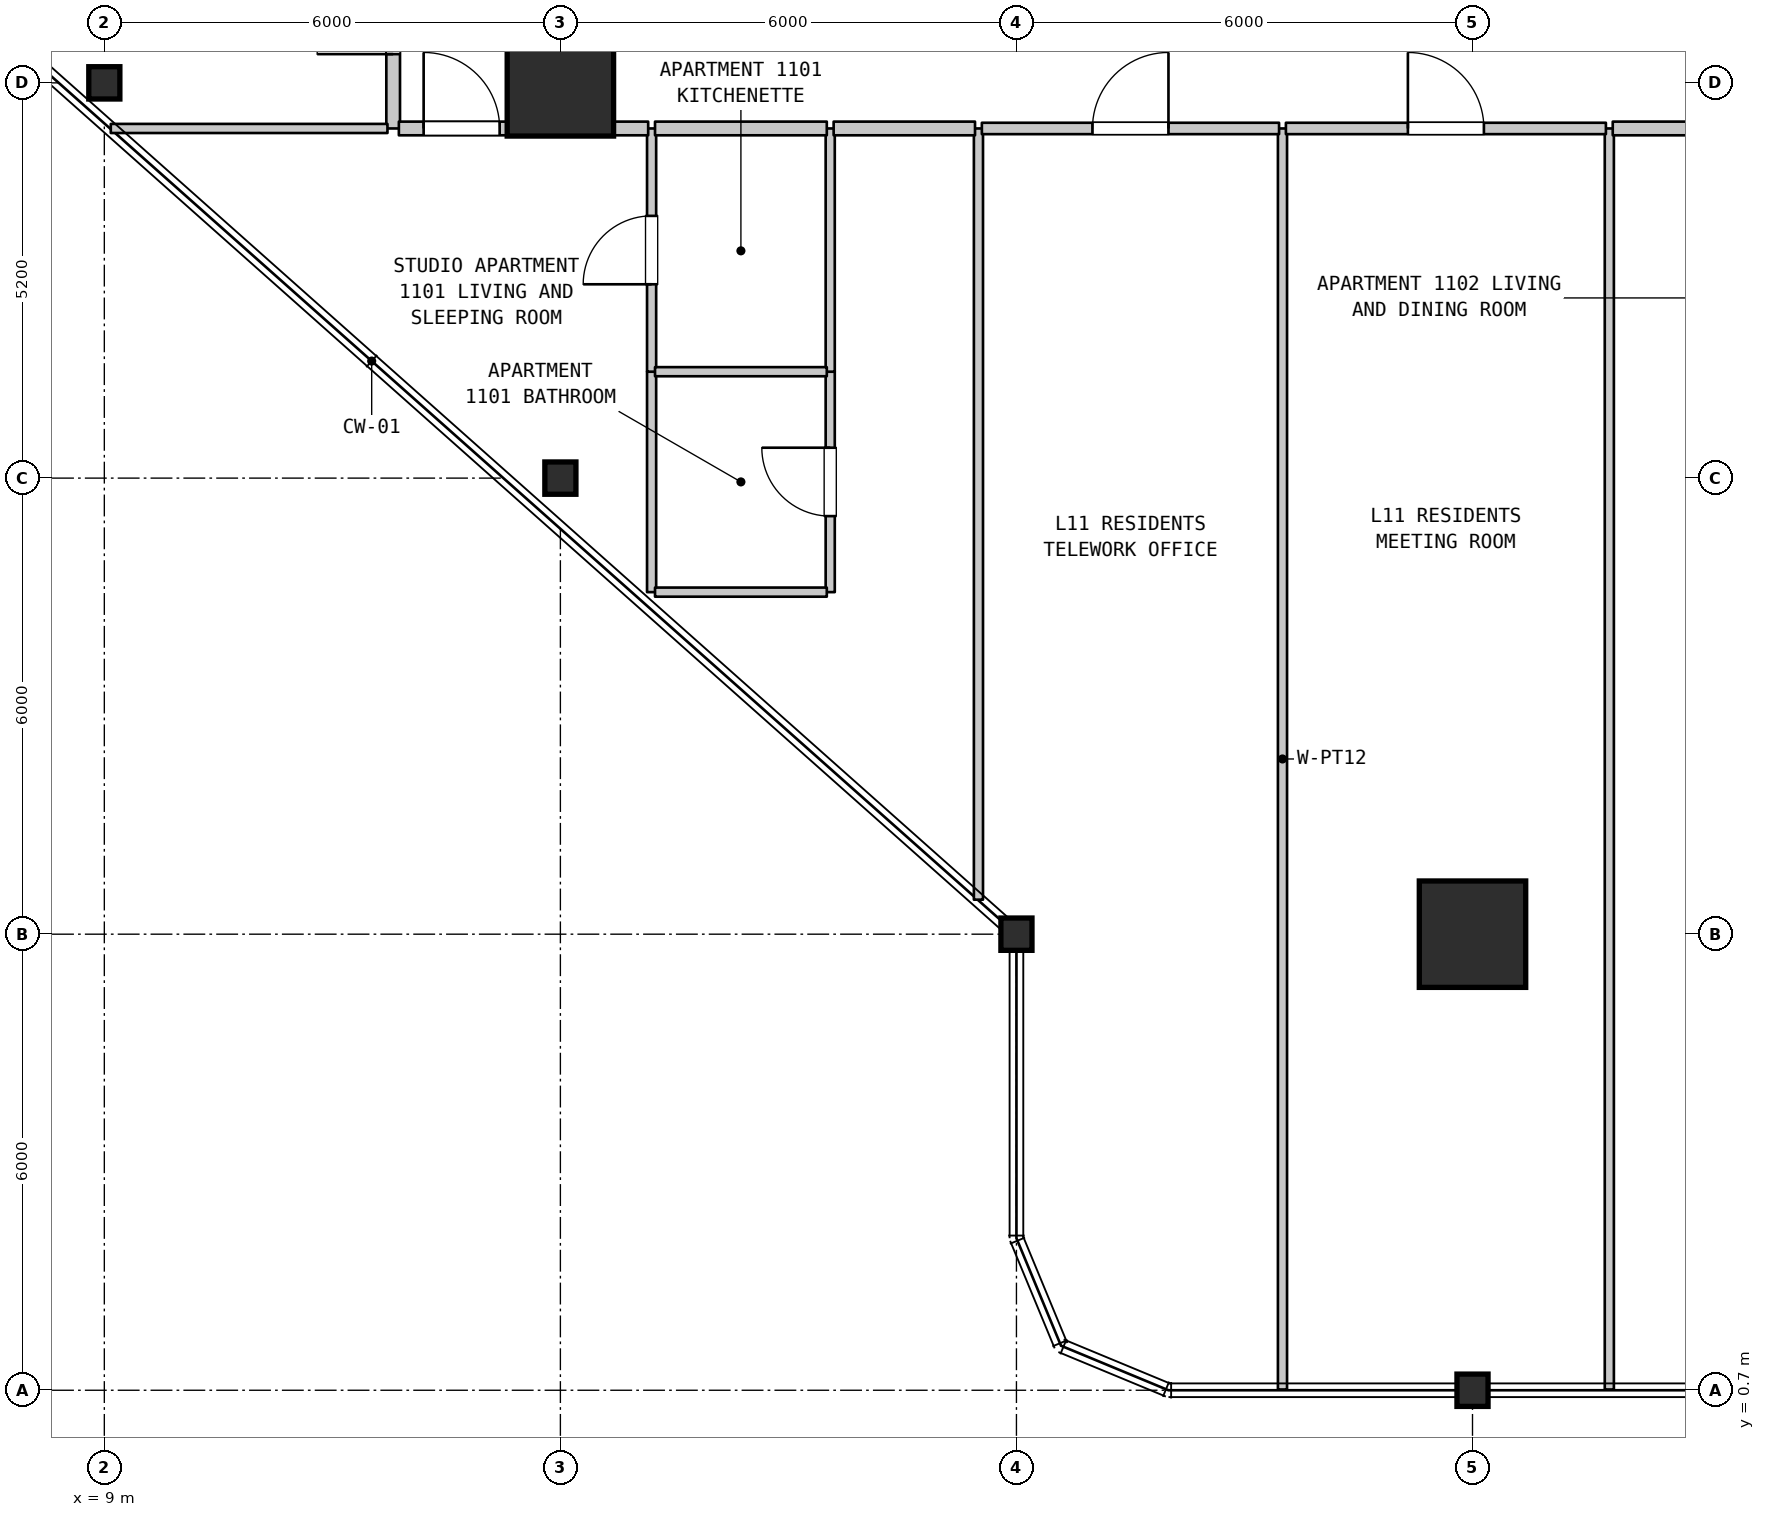
"""IFC4 building model, lengths in metres.
Left out: names, types, materials, properties, quantities, classifications, styles, units other than length and angle.
Written with IfcOpenShell. Run it as: python <this file> out.ifc"""

import sys

from ifc_helpers import new_model, si_unit, direction, frame, frame_2d, origin, origin_2d, place, context, subcontext, project, spatial, rectangle, i_section, extrude, element, fill, save


model = new_model("IFC4")
c1 = context("Model", 3, precision=1e-05, world=origin(), true_north=direction((0.0, 1.0)))
c2 = subcontext(c1, "Body", "Model", "MODEL_VIEW")
j1 = project(units=[si_unit("LENGTHUNIT", "METRE"), si_unit("PLANEANGLEUNIT", "RADIAN")], contexts=[c1])
p1 = place(None, origin())
s1 = spatial("IfcSite", under=j1, at=p1, CompositionType="ELEMENT")
p2 = place(p1, origin())
s2 = spatial("IfcBuilding", under=s1, at=p2, CompositionType="ELEMENT")
p3 = place(p2, frame((0.0, 0.0, 49.9)))
s3 = spatial("IfcBuildingStorey", under=s2, at=p3, CompositionType="ELEMENT", Elevation=49.9)
for number, where, z_axis, x_axis in (
    (1, (9.0, 17.9, 0.0), (0.0, 0.0, 1.0), (1.0, 0.0, 0.0)),
    (2, (15.0, 12.7, 0.0), (0.0, 0.0, 1.0), (1.0, 0.0, 0.0)),
):
    element("IfcColumn", number, at=place(p3, frame(where, z_axis=z_axis, x_axis=x_axis)), inside=s3, PredefinedType="COLUMN", context=c2, shape_type="SweptSolid", body=[
        extrude(i_section(OverallWidth=0.409, OverallDepth=0.425, WebThickness=0.032, FlangeThickness=0.052, FilletRadius=0.015, at=origin_2d()), origin(), (0.0, 0.0, 1.0), 3.7),
    ])
p4 = place(p3, frame((15.0, 17.9, 0.0), z_axis=(0.0, 0.0, 1.0), x_axis=(1.0, 0.0, 0.0)))
e3 = element("IfcColumn", 3, at=p4, inside=s3, PredefinedType="COLUMN", context=c2, shape_type="SweptSolid", body=[
    extrude(rectangle(XDim=1.4, YDim=1.4, at=origin_2d()), origin(), (0.0, 0.0, 1.0), 3.7),
])
for number, where, z_axis, x_axis in (
    (4, (21.0, 6.7, 0.0), (0.0, 0.0, 1.0), (1.0, 0.0, 0.0)),
    (5, (27.0, 0.7, 0.0), (0.0, 0.0, 1.0), (1.0, 0.0, 0.0)),
):
    element("IfcColumn", number, at=place(p3, frame(where, z_axis=z_axis, x_axis=x_axis)), inside=s3, PredefinedType="COLUMN", context=c2, shape_type="SweptSolid", body=[
        extrude(i_section(OverallWidth=0.409, OverallDepth=0.425, WebThickness=0.032, FlangeThickness=0.052, FilletRadius=0.015, at=origin_2d()), origin(), (0.0, 0.0, 1.0), 3.7),
    ])
p5 = place(p3, frame((27.0, 6.7, 0.0), z_axis=(0.0, 0.0, 1.0), x_axis=(1.0, 0.0, 0.0)))
e6 = element("IfcColumn", 6, at=p5, inside=s3, PredefinedType="COLUMN", context=c2, shape_type="SweptSolid", body=[
    extrude(rectangle(XDim=1.4, YDim=1.4, at=origin_2d()), origin(), (0.0, 0.0, 1.0), 3.7),
])
p6 = place(p3, frame((12.8, 17.3, 0.0), z_axis=(0.0, 0.0, 1.0), x_axis=(0.0, 1.0, 0.0)))
e7 = element("IfcWall", 7, at=p6, inside=s3, PredefinedType="STANDARD", context=c2, shape_type="SweptSolid", body=[
    extrude(rectangle(XDim=3.1, YDim=0.18, at=frame_2d((1.55, 0.0))), origin(), (0.0, 0.0, 1.0), 3.385),
])
p7 = place(p6, frame((0.978, 0.0, 0.0)))
e8 = element("IfcOpeningElement", 8, at=p7, cuts=e7, PredefinedType="OPENING", context=c2, shape_type="SweptSolid", body=[
    extrude(rectangle(XDim=1.0, YDim=2.15, at=frame_2d((0.5, 1.075))), frame((0.0, 0.1, 0.0), z_axis=(0.0, -1.0, 0.0), x_axis=(1.0, 0.0, 0.0)), (0.0, 0.0, 1.0), 0.2),
])
p8 = place(p3, frame((16.2, 11.2, 0.0), z_axis=(0.0, 0.0, 1.0), x_axis=(0.0, 1.0, 0.0)))
e9 = element("IfcWall", 9, at=p8, inside=s3, PredefinedType="PARTITIONING", context=c2, shape_type="SweptSolid", body=[
    extrude(rectangle(XDim=2.9, YDim=0.12, at=frame_2d((1.45, 0.0))), origin(), (0.0, 0.0, 1.0), 3.385),
])
p9 = place(p3, frame((16.2, 14.1, 0.0), z_axis=(0.0, 0.0, 1.0), x_axis=(0.0, 1.0, 0.0)))
e10 = element("IfcWall", 10, at=p9, inside=s3, PredefinedType="PARTITIONING", context=c2, shape_type="SweptSolid", body=[
    extrude(rectangle(XDim=3.2, YDim=0.12, at=frame_2d((1.6, 0.0))), origin(), (0.0, 0.0, 1.0), 3.385),
])
p10 = place(p9, frame((1.15, 0.0, 0.0)))
e11 = element("IfcOpeningElement", 11, at=p10, cuts=e10, PredefinedType="OPENING", context=c2, shape_type="SweptSolid", body=[
    extrude(rectangle(XDim=0.9, YDim=2.15, at=frame_2d((0.45, 1.075))), frame((0.0, 0.07, 0.0), z_axis=(0.0, -1.0, 0.0), x_axis=(1.0, 0.0, 0.0)), (0.0, 0.0, 1.0), 0.14),
])
p11 = place(p3, frame((18.55, 11.2, 0.0), z_axis=(0.0, 0.0, 1.0), x_axis=(0.0, 1.0, 0.0)))
e12 = element("IfcWall", 12, at=p11, inside=s3, PredefinedType="PARTITIONING", context=c2, shape_type="SweptSolid", body=[
    extrude(rectangle(XDim=2.9, YDim=0.12, at=frame_2d((1.45, 0.0))), origin(), (0.0, 0.0, 1.0), 3.385),
])
p12 = place(p11, frame((1.0, 0.0, 0.0)))
e13 = element("IfcOpeningElement", 13, at=p12, cuts=e12, PredefinedType="OPENING", context=c2, shape_type="SweptSolid", body=[
    extrude(rectangle(XDim=0.9, YDim=2.1, at=frame_2d((0.45, 1.05))), frame((0.0, 0.07, 0.0), z_axis=(0.0, -1.0, 0.0), x_axis=(1.0, 0.0, 0.0)), (0.0, 0.0, 1.0), 0.14),
])
p13 = place(p3, frame((18.55, 14.1, 0.0), z_axis=(0.0, 0.0, 1.0), x_axis=(0.0, 1.0, 0.0)))
e14 = element("IfcWall", 14, at=p13, inside=s3, PredefinedType="PARTITIONING", context=c2, shape_type="SweptSolid", body=[
    extrude(rectangle(XDim=3.2, YDim=0.12, at=frame_2d((1.6, 0.0))), origin(), (0.0, 0.0, 1.0), 3.385),
])
p14 = place(p3, frame((20.5, 7.154, 0.0), z_axis=(0.0, 0.0, 1.0), x_axis=(0.0, 1.0, 0.0)))
e15 = element("IfcWall", 15, at=p14, inside=s3, PredefinedType="PARTITIONING", context=c2, shape_type="SweptSolid", body=[
    extrude(rectangle(XDim=10.146, YDim=0.12, at=frame_2d((5.073, 0.0))), origin(), (0.0, 0.0, 1.0), 3.385),
])
for number, where, z_axis, x_axis in (
    (16, (24.5, 0.71, 0.0), (0.0, 0.0, 1.0), (0.0, 1.0, 0.0)),
    (17, (28.8, 0.71, 0.0), (0.0, 0.0, 1.0), (0.0, 1.0, 0.0)),
):
    element("IfcWall", number, at=place(p3, frame(where, z_axis=z_axis, x_axis=x_axis)), inside=s3, PredefinedType="PARTITIONING", context=c2, shape_type="SweptSolid", body=[
        extrude(rectangle(XDim=16.59, YDim=0.12, at=frame_2d((8.295, 0.0))), origin(), (0.0, 0.0, 1.0), 3.385),
    ])
for number, where, z_axis, x_axis in (
    (18, (16.245, 11.2, 0.0), (0.0, 0.0, 1.0), (1.0, 0.0, 0.0)),
    (19, (16.245, 14.1, 0.0), (0.0, 0.0, 1.0), (1.0, 0.0, 0.0)),
):
    element("IfcWall", number, at=place(p3, frame(where, z_axis=z_axis, x_axis=x_axis)), inside=s3, PredefinedType="PARTITIONING", context=c2, shape_type="SweptSolid", body=[
        extrude(rectangle(XDim=2.26, YDim=0.12, at=frame_2d((1.13, 0.0))), origin(), (0.0, 0.0, 1.0), 3.385),
    ])
p15 = place(p3, frame((9.085, 17.3, 0.0), z_axis=(0.0, 0.0, 1.0), x_axis=(1.0, 0.0, 0.0)))
e20 = element("IfcWall", 20, at=p15, inside=s3, PredefinedType="PARTITIONING", context=c2, shape_type="SweptSolid", body=[
    extrude(rectangle(XDim=3.64, YDim=0.12, at=frame_2d((1.82, 0.0))), origin(), (0.0, 0.0, 1.0), 3.385),
])
p16 = place(p3, frame((12.875, 17.3, 0.0), z_axis=(0.0, 0.0, 1.0), x_axis=(1.0, 0.0, 0.0)))
e21 = element("IfcWall", 21, at=p16, inside=s3, PredefinedType="STANDARD", context=c2, shape_type="SweptSolid", body=[
    extrude(rectangle(XDim=3.28, YDim=0.18, at=frame_2d((1.64, 0.0))), origin(), (0.0, 0.0, 1.0), 3.385),
])
p17 = place(p16, frame((0.326, 0.0, 0.0)))
e22 = element("IfcOpeningElement", 22, at=p17, cuts=e21, PredefinedType="OPENING", context=c2, shape_type="SweptSolid", body=[
    extrude(rectangle(XDim=1.0, YDim=2.15, at=frame_2d((0.5, 1.075))), frame((0.0, 0.1, 0.0), z_axis=(0.0, -1.0, 0.0), x_axis=(1.0, 0.0, 0.0)), (0.0, 0.0, 1.0), 0.2),
])
p18 = place(p3, frame((16.245, 17.3, 0.0), z_axis=(0.0, 0.0, 1.0), x_axis=(1.0, 0.0, 0.0)))
e23 = element("IfcWall", 23, at=p18, inside=s3, PredefinedType="STANDARD", context=c2, shape_type="SweptSolid", body=[
    extrude(rectangle(XDim=2.26, YDim=0.18, at=frame_2d((1.13, 0.0))), origin(), (0.0, 0.0, 1.0), 3.385),
])
p19 = place(p3, frame((18.595, 17.3, 0.0), z_axis=(0.0, 0.0, 1.0), x_axis=(1.0, 0.0, 0.0)))
e24 = element("IfcWall", 24, at=p19, inside=s3, PredefinedType="STANDARD", context=c2, shape_type="SweptSolid", body=[
    extrude(rectangle(XDim=1.86, YDim=0.18, at=frame_2d((0.93, 0.0))), origin(), (0.0, 0.0, 1.0), 3.385),
])
p20 = place(p3, frame((20.545, 17.3, 0.0), z_axis=(0.0, 0.0, 1.0), x_axis=(1.0, 0.0, 0.0)))
e25 = element("IfcWall", 25, at=p20, inside=s3, PredefinedType="STANDARD", context=c2, shape_type="SweptSolid", body=[
    extrude(rectangle(XDim=3.91, YDim=0.15, at=frame_2d((1.955, 0.0))), origin(), (0.0, 0.0, 1.0), 3.385),
])
p21 = place(p20, frame((1.455, 0.0, 0.0)))
e26 = element("IfcOpeningElement", 26, at=p21, cuts=e25, PredefinedType="OPENING", context=c2, shape_type="SweptSolid", body=[
    extrude(rectangle(XDim=1.0, YDim=2.15, at=frame_2d((0.5, 1.075))), frame((0.0, 0.085, 0.0), z_axis=(0.0, -1.0, 0.0), x_axis=(1.0, 0.0, 0.0)), (0.0, 0.0, 1.0), 0.17),
])
p22 = place(p3, frame((24.545, 17.3, 0.0), z_axis=(0.0, 0.0, 1.0), x_axis=(1.0, 0.0, 0.0)))
e27 = element("IfcWall", 27, at=p22, inside=s3, PredefinedType="STANDARD", context=c2, shape_type="SweptSolid", body=[
    extrude(rectangle(XDim=4.21, YDim=0.15, at=frame_2d((2.105, 0.0))), origin(), (0.0, 0.0, 1.0), 3.385),
])
p23 = place(p22, frame((1.605, 0.0, 0.0)))
e28 = element("IfcOpeningElement", 28, at=p23, cuts=e27, PredefinedType="OPENING", context=c2, shape_type="SweptSolid", body=[
    extrude(rectangle(XDim=1.0, YDim=2.15, at=frame_2d((0.5, 1.075))), frame((0.0, 0.085, 0.0), z_axis=(0.0, -1.0, 0.0), x_axis=(1.0, 0.0, 0.0)), (0.0, 0.0, 1.0), 0.17),
])
p24 = place(p3, frame((28.845, 17.3, 0.0), z_axis=(0.0, 0.0, 1.0), x_axis=(1.0, 0.0, 0.0)))
e29 = element("IfcWall", 29, at=p24, inside=s3, PredefinedType="STANDARD", context=c2, shape_type="SweptSolid", body=[
    extrude(rectangle(XDim=4.38, YDim=0.18, at=frame_2d((2.19, 0.0))), origin(), (0.0, 0.0, 1.0), 3.385),
])
p25 = place(p24, frame((1.619, 0.0, 0.0)))
e30 = element("IfcOpeningElement", 30, at=p25, cuts=e29, PredefinedType="OPENING", context=c2, shape_type="SweptSolid", body=[
    extrude(rectangle(XDim=1.0, YDim=2.15, at=frame_2d((0.5, 1.075))), frame((0.0, 0.1, 0.0), z_axis=(0.0, -1.0, 0.0), x_axis=(1.0, 0.0, 0.0)), (0.0, 0.0, 1.0), 0.2),
])
p26 = place(p7, origin())
e31 = element("IfcDoor", 31, at=p26, inside=s3, OperationType="SINGLE_SWING_LEFT", PredefinedType="DOOR", context=c2, shape_type="SweptSolid", body=[
    extrude(rectangle(XDim=1.0, YDim=2.15, at=frame_2d((0.5, 1.075))), frame((0.0, 0.025, 0.0), z_axis=(0.0, -1.0, 0.0), x_axis=(1.0, 0.0, 0.0)), (0.0, 0.0, 1.0), 0.05),
])
fill(e8, e31)
p27 = place(p10, origin())
e32 = element("IfcDoor", 32, at=p27, inside=s3, OperationType="SINGLE_SWING_LEFT", PredefinedType="DOOR", context=c2, shape_type="SweptSolid", body=[
    extrude(rectangle(XDim=0.9, YDim=2.15, at=frame_2d((0.45, 1.075))), frame((0.0, 0.025, 0.0), z_axis=(0.0, -1.0, 0.0), x_axis=(1.0, 0.0, 0.0)), (0.0, 0.0, 1.0), 0.05),
])
fill(e11, e32)
p28 = place(p12, origin())
e33 = element("IfcDoor", 33, at=p28, inside=s3, OperationType="SINGLE_SWING_RIGHT", PredefinedType="DOOR", context=c2, shape_type="SweptSolid", body=[
    extrude(rectangle(XDim=0.9, YDim=2.1, at=frame_2d((0.45, 1.05))), frame((0.0, 0.025, 0.0), z_axis=(0.0, -1.0, 0.0), x_axis=(1.0, 0.0, 0.0)), (0.0, 0.0, 1.0), 0.05),
])
fill(e13, e33)
p29 = place(p17, origin())
e34 = element("IfcDoor", 34, at=p29, inside=s3, OperationType="SINGLE_SWING_LEFT", PredefinedType="DOOR", context=c2, shape_type="SweptSolid", body=[
    extrude(rectangle(XDim=1.0, YDim=2.15, at=frame_2d((0.5, 1.075))), frame((0.0, 0.025, 0.0), z_axis=(0.0, -1.0, 0.0), x_axis=(1.0, 0.0, 0.0)), (0.0, 0.0, 1.0), 0.05),
])
fill(e22, e34)
p30 = place(p21, origin())
e35 = element("IfcDoor", 35, at=p30, inside=s3, OperationType="SINGLE_SWING_RIGHT", PredefinedType="DOOR", context=c2, shape_type="SweptSolid", body=[
    extrude(rectangle(XDim=1.0, YDim=2.15, at=frame_2d((0.5, 1.075))), frame((0.0, 0.025, 0.0), z_axis=(0.0, -1.0, 0.0), x_axis=(1.0, 0.0, 0.0)), (0.0, 0.0, 1.0), 0.05),
])
fill(e26, e35)
p31 = place(p23, origin())
e36 = element("IfcDoor", 36, at=p31, inside=s3, OperationType="SINGLE_SWING_LEFT", PredefinedType="DOOR", context=c2, shape_type="SweptSolid", body=[
    extrude(rectangle(XDim=1.0, YDim=2.15, at=frame_2d((0.5, 1.075))), frame((0.0, 0.025, 0.0), z_axis=(0.0, -1.0, 0.0), x_axis=(1.0, 0.0, 0.0)), (0.0, 0.0, 1.0), 0.05),
])
fill(e28, e36)
save(model, sys.argv[1])
